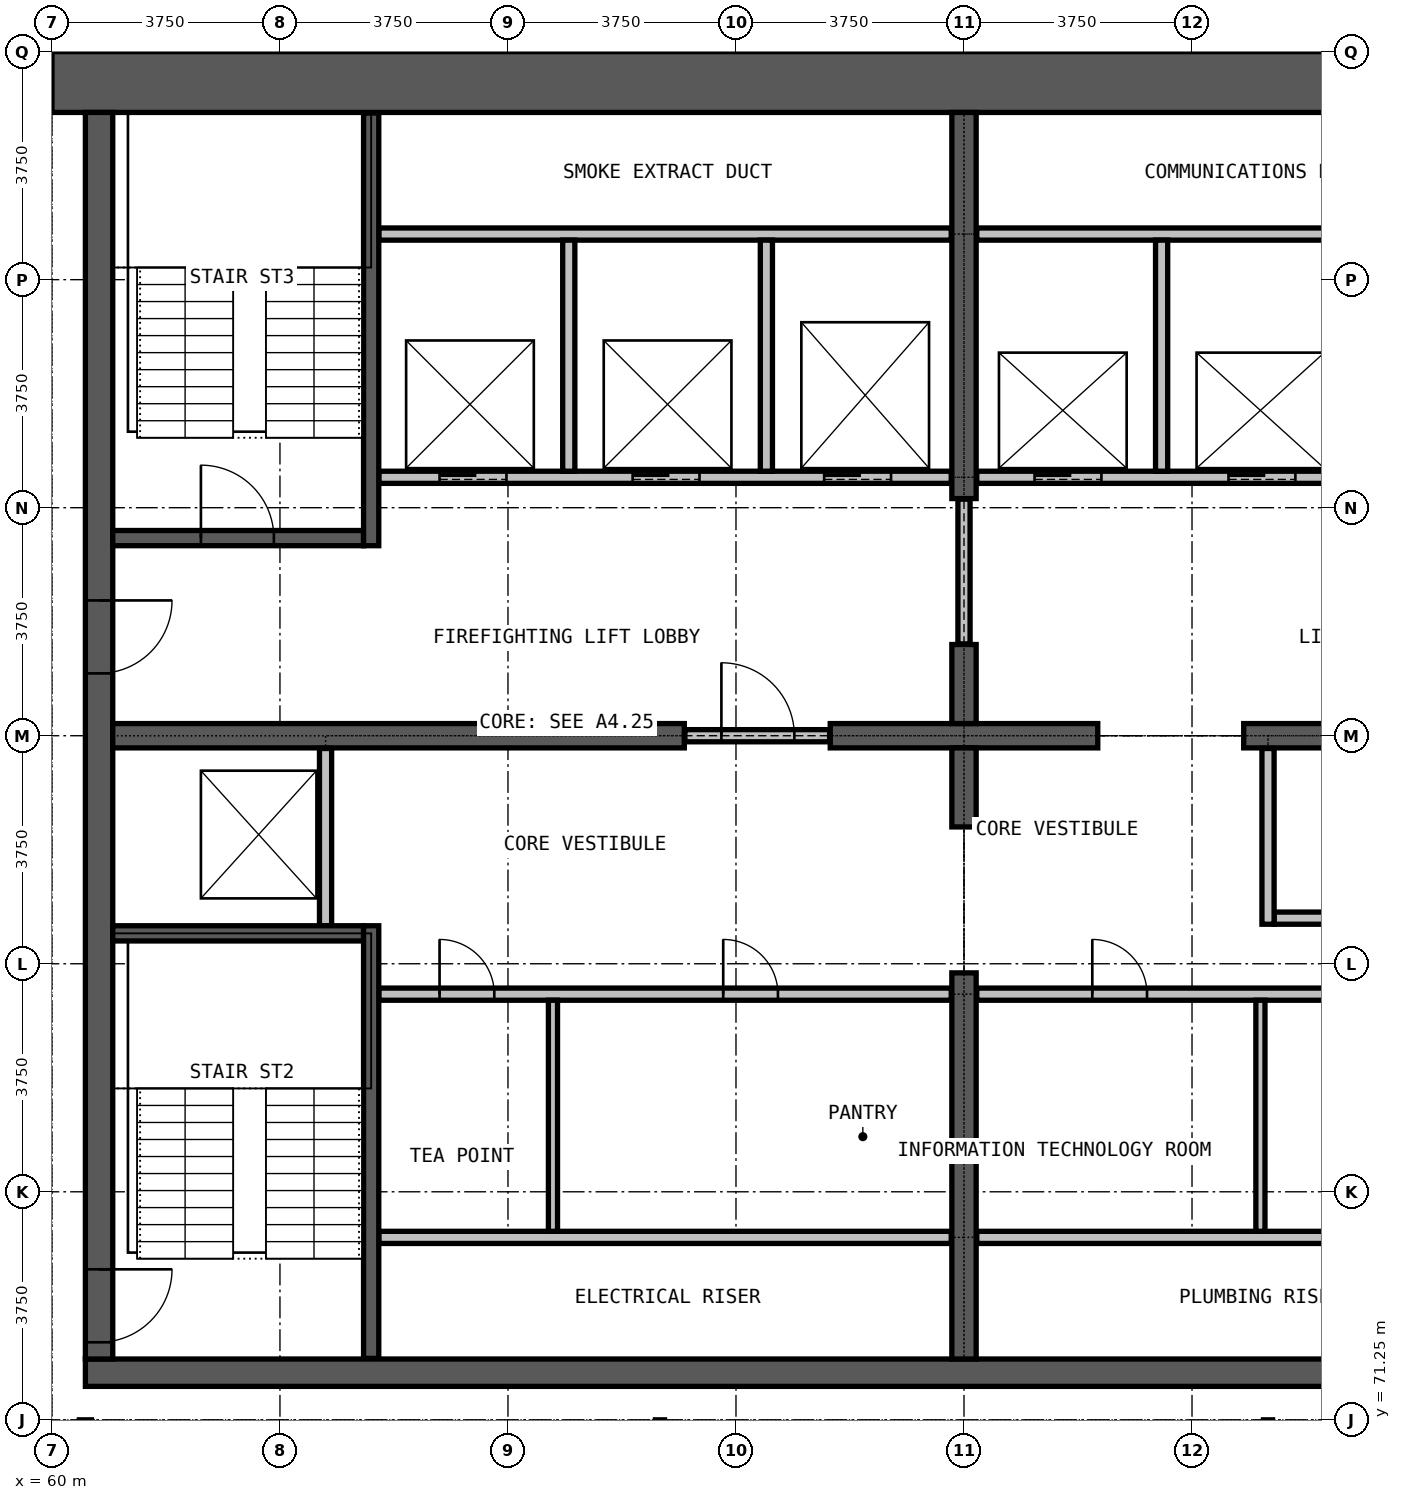
"""IFC4 building model, lengths in metres.
Left out: names, types, materials, properties, quantities, classifications, styles, units other than length and angle.
Written with IfcOpenShell. Run it as: python <this file> out.ifc"""

import sys

from ifc_helpers import new_model, si_unit, direction, frame, frame_2d, origin, place, context, subcontext, project, spatial, rectangle, extrude, element, fill, save


model = new_model("IFC4")
c1 = context("Model", 3, precision=1e-05, world=origin(), true_north=direction((0.0, 1.0)))
c2 = subcontext(c1, "Body", "Model", "MODEL_VIEW")
j1 = project(units=[si_unit("LENGTHUNIT", "METRE"), si_unit("PLANEANGLEUNIT", "RADIAN")], contexts=[c1])
p1 = place(None, origin())
s1 = spatial("IfcSite", under=j1, at=p1, CompositionType="ELEMENT")
p2 = place(p1, origin())
s2 = spatial("IfcBuilding", under=s1, at=p2, CompositionType="ELEMENT")
p3 = place(p2, frame((0.0, 0.0, 258.5)))
s3 = spatial("IfcBuildingStorey", under=s2, at=p3, CompositionType="ELEMENT", Elevation=258.5)
p4 = place(p3, frame((60.55, 72.025, 0.0), z_axis=(0.0, 0.0, 1.0), x_axis=(1.0, 0.0, 0.0)))
e1 = element("IfcWall", 1, at=p4, inside=s3, PredefinedType="SHEAR", context=c2, shape_type="SweptSolid", body=[
    extrude(rectangle(XDim=28.9, YDim=0.45, at=frame_2d((14.45, 0.0))), origin(), (0.0, 0.0, 1.0), 3.6),
])
p5 = place(p3, frame((90.0, 93.25, 0.0), z_axis=(0.0, 0.0, 1.0), x_axis=(-1.0, 0.0, 0.0)))
e2 = element("IfcWall", 2, at=p5, inside=s3, PredefinedType="SHEAR", context=c2, shape_type="SweptSolid", body=[
    extrude(rectangle(XDim=30.0, YDim=1.0, at=frame_2d((15.0, 0.0))), origin(), (0.0, 0.0, 1.0), 3.6),
])
p6 = place(p3, frame((60.775, 92.75, 0.0), z_axis=(0.0, 0.0, 1.0), x_axis=(0.0, -1.0, 0.0)))
e3 = element("IfcWall", 3, at=p6, inside=s3, PredefinedType="SHEAR", context=c2, shape_type="SweptSolid", body=[
    extrude(rectangle(XDim=20.5, YDim=0.45, at=frame_2d((10.25, 0.0))), origin(), (0.0, 0.0, 1.0), 3.6),
])
p7 = place(p6, frame((19.025, 0.0, 0.0)))
e4 = element("IfcOpeningElement", 4, at=p7, cuts=e3, PredefinedType="OPENING", context=c2, shape_type="SweptSolid", body=[
    extrude(rectangle(XDim=1.2, YDim=2.2, at=frame_2d((0.6, 1.1))), frame((0.0, 0.235, 0.0), z_axis=(0.0, -1.0, 0.0), x_axis=(1.0, 0.0, 0.0)), (0.0, 0.0, 1.0), 0.47),
])
p8 = place(p6, frame((8.025, 0.0, 0.0)))
e5 = element("IfcOpeningElement", 5, at=p8, cuts=e3, PredefinedType="OPENING", context=c2, shape_type="SweptSolid", body=[
    extrude(rectangle(XDim=1.2, YDim=2.2, at=frame_2d((0.6, 1.1))), frame((0.0, 0.235, 0.0), z_axis=(0.0, -1.0, 0.0), x_axis=(1.0, 0.0, 0.0)), (0.0, 0.0, 1.0), 0.47),
])
p9 = place(p3, frame((61.0, 82.5, 0.0), z_axis=(0.0, 0.0, 1.0), x_axis=(1.0, 0.0, 0.0)))
e6 = element("IfcWall", 6, at=p9, inside=s3, PredefinedType="SHEAR", context=c2, shape_type="SweptSolid", body=[
    extrude(rectangle(XDim=9.4, YDim=0.4, at=frame_2d((4.7, 0.0))), origin(), (0.0, 0.0, 1.0), 3.6),
])
p10 = place(p3, frame((72.8, 82.5, 0.0), z_axis=(0.0, 0.0, 1.0), x_axis=(1.0, 0.0, 0.0)))
e7 = element("IfcWall", 7, at=p10, inside=s3, PredefinedType="SHEAR", context=c2, shape_type="SweptSolid", body=[
    extrude(rectangle(XDim=4.4, YDim=0.4, at=frame_2d((2.2, 0.0))), origin(), (0.0, 0.0, 1.0), 3.6),
])
p11 = place(p3, frame((79.6, 82.5, 0.0), z_axis=(0.0, 0.0, 1.0), x_axis=(1.0, 0.0, 0.0)))
e8 = element("IfcWall", 8, at=p11, inside=s3, PredefinedType="SHEAR", context=c2, shape_type="SweptSolid", body=[
    extrude(rectangle(XDim=9.4, YDim=0.4, at=frame_2d((4.7, 0.0))), origin(), (0.0, 0.0, 1.0), 3.6),
])
p12 = place(p3, frame((75.0, 72.25, 0.0), z_axis=(0.0, 0.0, 1.0), x_axis=(0.0, 1.0, 0.0)))
e9 = element("IfcWall", 9, at=p12, inside=s3, PredefinedType="SHEAR", context=c2, shape_type="SweptSolid", body=[
    extrude(rectangle(XDim=6.35, YDim=0.4, at=frame_2d((3.175, 0.0))), origin(), (0.0, 0.0, 1.0), 3.6),
])
for number, where, z_axis, x_axis in (
    (10, (75.0, 81.0, 0.0), (0.0, 0.0, 1.0), (0.0, 1.0, 0.0)),
    (11, (75.0, 82.7, 0.0), (0.0, 0.0, 1.0), (0.0, 1.0, 0.0)),
):
    element("IfcWall", number, at=place(p3, frame(where, z_axis=z_axis, x_axis=x_axis)), inside=s3, PredefinedType="SHEAR", context=c2, shape_type="SweptSolid", body=[
        extrude(rectangle(XDim=1.3, YDim=0.4, at=frame_2d((0.65, 0.0))), origin(), (0.0, 0.0, 1.0), 3.6),
    ])
p13 = place(p3, frame((75.0, 86.4, 0.0), z_axis=(0.0, 0.0, 1.0), x_axis=(0.0, 1.0, 0.0)))
e12 = element("IfcWall", 12, at=p13, inside=s3, PredefinedType="SHEAR", context=c2, shape_type="SweptSolid", body=[
    extrude(rectangle(XDim=6.35, YDim=0.4, at=frame_2d((3.175, 0.0))), origin(), (0.0, 0.0, 1.0), 3.6),
])
for number, where, z_axis, x_axis in (
    (13, (65.375, 74.25, 0.0), (0.0, 0.0, 1.0), (1.0, 0.0, 0.0)),
    (14, (75.21, 74.25, 0.0), (0.0, 0.0, 1.0), (1.0, 0.0, 0.0)),
):
    element("IfcWall", number, at=place(p3, frame(where, z_axis=z_axis, x_axis=x_axis)), inside=s3, PredefinedType="PARTITIONING", context=c2, shape_type="SweptSolid", body=[
        extrude(rectangle(XDim=9.415, YDim=0.2, at=frame_2d((4.708, 0.0))), origin(), (0.0, 0.0, 1.0), 3.3),
    ])
p14 = place(p3, frame((65.375, 78.25, 0.0), z_axis=(0.0, 0.0, 1.0), x_axis=(1.0, 0.0, 0.0)))
e15 = element("IfcWall", 15, at=p14, inside=s3, PredefinedType="PARTITIONING", context=c2, shape_type="SweptSolid", body=[
    extrude(rectangle(XDim=9.415, YDim=0.2, at=frame_2d((4.708, 0.0))), origin(), (0.0, 0.0, 1.0), 3.3),
])
p15 = place(p14, frame((1.0, 0.0, 0.0)))
e16 = element("IfcOpeningElement", 16, at=p15, cuts=e15, PredefinedType="OPENING", context=c2, shape_type="SweptSolid", body=[
    extrude(rectangle(XDim=0.9, YDim=2.2, at=frame_2d((0.45, 1.1))), frame((0.0, 0.11, 0.0), z_axis=(0.0, -1.0, 0.0), x_axis=(1.0, 0.0, 0.0)), (0.0, 0.0, 1.0), 0.22),
])
p16 = place(p14, frame((5.665, 0.0, 0.0)))
e17 = element("IfcOpeningElement", 17, at=p16, cuts=e15, PredefinedType="OPENING", context=c2, shape_type="SweptSolid", body=[
    extrude(rectangle(XDim=0.9, YDim=2.2, at=frame_2d((0.45, 1.1))), frame((0.0, 0.11, 0.0), z_axis=(0.0, -1.0, 0.0), x_axis=(1.0, 0.0, 0.0)), (0.0, 0.0, 1.0), 0.22),
])
p17 = place(p3, frame((75.21, 78.25, 0.0), z_axis=(0.0, 0.0, 1.0), x_axis=(1.0, 0.0, 0.0)))
e18 = element("IfcWall", 18, at=p17, inside=s3, PredefinedType="PARTITIONING", context=c2, shape_type="SweptSolid", body=[
    extrude(rectangle(XDim=9.415, YDim=0.2, at=frame_2d((4.708, 0.0))), origin(), (0.0, 0.0, 1.0), 3.3),
])
p18 = place(p17, frame((1.9, 0.0, 0.0)))
e19 = element("IfcOpeningElement", 19, at=p18, cuts=e18, PredefinedType="OPENING", context=c2, shape_type="SweptSolid", body=[
    extrude(rectangle(XDim=0.9, YDim=2.2, at=frame_2d((0.45, 1.1))), frame((0.0, 0.11, 0.0), z_axis=(0.0, -1.0, 0.0), x_axis=(1.0, 0.0, 0.0)), (0.0, 0.0, 1.0), 0.22),
])
p19 = place(p17, frame((6.565, 0.0, 0.0)))
e20 = element("IfcOpeningElement", 20, at=p19, cuts=e18, PredefinedType="OPENING", context=c2, shape_type="SweptSolid", body=[
    extrude(rectangle(XDim=0.9, YDim=2.2, at=frame_2d((0.45, 1.1))), frame((0.0, 0.11, 0.0), z_axis=(0.0, -1.0, 0.0), x_axis=(1.0, 0.0, 0.0)), (0.0, 0.0, 1.0), 0.22),
])
p20 = place(p3, frame((80.1, 79.5, 0.0), z_axis=(0.0, 0.0, 1.0), x_axis=(1.0, 0.0, 0.0)))
e21 = element("IfcWall", 21, at=p20, inside=s3, PredefinedType="PARTITIONING", context=c2, shape_type="SweptSolid", body=[
    extrude(rectangle(XDim=5.3, YDim=0.2, at=frame_2d((2.65, 0.0))), origin(), (0.0, 0.0, 1.0), 3.3),
])
p21 = place(p20, frame((2.2, 0.0, 0.0)))
e22 = element("IfcOpeningElement", 22, at=p21, cuts=e21, PredefinedType="OPENING", context=c2, shape_type="SweptSolid", body=[
    extrude(rectangle(XDim=0.9, YDim=2.2, at=frame_2d((0.45, 1.1))), frame((0.0, 0.11, 0.0), z_axis=(0.0, -1.0, 0.0), x_axis=(1.0, 0.0, 0.0)), (0.0, 0.0, 1.0), 0.22),
])
p22 = place(p3, frame((70.41, 82.5, 0.0), z_axis=(0.0, 0.0, 1.0), x_axis=(1.0, 0.0, 0.0)))
e23 = element("IfcWall", 23, at=p22, inside=s3, PredefinedType="PARTITIONING", context=c2, shape_type="SweptSolid", body=[
    extrude(rectangle(XDim=2.38, YDim=0.2, at=frame_2d((1.19, 0.0))), origin(), (0.0, 0.0, 1.0), 2.4),
])
p23 = place(p22, frame((0.6, 0.0, 0.0)))
e24 = element("IfcOpeningElement", 24, at=p23, cuts=e23, PredefinedType="OPENING", context=c2, shape_type="SweptSolid", body=[
    extrude(rectangle(XDim=1.2, YDim=2.2, at=frame_2d((0.6, 1.1))), frame((0.0, 0.11, 0.0), z_axis=(0.0, -1.0, 0.0), x_axis=(1.0, 0.0, 0.0)), (0.0, 0.0, 1.0), 0.22),
])
p24 = place(p3, frame((75.0, 84.01, 0.0), z_axis=(0.0, 0.0, 1.0), x_axis=(0.0, 1.0, 0.0)))
e25 = element("IfcWall", 25, at=p24, inside=s3, PredefinedType="PARTITIONING", context=c2, shape_type="SweptSolid", body=[
    extrude(rectangle(XDim=2.38, YDim=0.2, at=frame_2d((1.19, 0.0))), origin(), (0.0, 0.0, 1.0), 2.4),
])
p25 = place(p3, frame((80.0, 79.4, 0.0), z_axis=(0.0, 0.0, 1.0), x_axis=(0.0, 1.0, 0.0)))
e26 = element("IfcWall", 26, at=p25, inside=s3, PredefinedType="PARTITIONING", context=c2, shape_type="SweptSolid", body=[
    extrude(rectangle(XDim=2.89, YDim=0.2, at=frame_2d((1.445, 0.0))), origin(), (0.0, 0.0, 1.0), 3.3),
])
for number, where, z_axis, x_axis in (
    (27, (68.24, 74.35, 0.0), (0.0, 0.0, 1.0), (0.0, 1.0, 0.0)),
    (28, (79.875, 74.35, 0.0), (0.0, 0.0, 1.0), (0.0, 1.0, 0.0)),
):
    element("IfcWall", number, at=place(p3, frame(where, z_axis=z_axis, x_axis=x_axis)), inside=s3, PredefinedType="PARTITIONING", context=c2, shape_type="SweptSolid", body=[
        extrude(rectangle(XDim=3.8, YDim=0.15, at=frame_2d((1.9, 0.0))), origin(), (0.0, 0.0, 1.0), 3.3),
    ])
p26 = place(p3, frame((65.375, 86.75, 0.0), z_axis=(0.0, 0.0, 1.0), x_axis=(1.0, 0.0, 0.0)))
e29 = element("IfcWall", 29, at=p26, inside=s3, PredefinedType="PARTITIONING", context=c2, shape_type="SweptSolid", body=[
    extrude(rectangle(XDim=9.415, YDim=0.2, at=frame_2d((4.708, 0.0))), origin(), (0.0, 0.0, 1.0), 3.3),
])
p27 = place(p26, frame((1.0, 0.0, 0.0)))
e30 = element("IfcOpeningElement", 30, at=p27, cuts=e29, PredefinedType="OPENING", context=c2, shape_type="SweptSolid", body=[
    extrude(rectangle(XDim=1.1, YDim=2.2, at=frame_2d((0.55, 1.1))), frame((0.0, 0.11, 0.0), z_axis=(0.0, -1.0, 0.0), x_axis=(1.0, 0.0, 0.0)), (0.0, 0.0, 1.0), 0.22),
])
p28 = place(p26, frame((4.175, 0.0, 0.0)))
e31 = element("IfcOpeningElement", 31, at=p28, cuts=e29, PredefinedType="OPENING", context=c2, shape_type="SweptSolid", body=[
    extrude(rectangle(XDim=1.1, YDim=2.2, at=frame_2d((0.55, 1.1))), frame((0.0, 0.11, 0.0), z_axis=(0.0, -1.0, 0.0), x_axis=(1.0, 0.0, 0.0)), (0.0, 0.0, 1.0), 0.22),
])
p29 = place(p26, frame((7.325, 0.0, 0.0)))
e32 = element("IfcOpeningElement", 32, at=p29, cuts=e29, PredefinedType="OPENING", context=c2, shape_type="SweptSolid", body=[
    extrude(rectangle(XDim=1.1, YDim=2.2, at=frame_2d((0.55, 1.1))), frame((0.0, 0.11, 0.0), z_axis=(0.0, -1.0, 0.0), x_axis=(1.0, 0.0, 0.0)), (0.0, 0.0, 1.0), 0.22),
])
p30 = place(p3, frame((75.21, 86.75, 0.0), z_axis=(0.0, 0.0, 1.0), x_axis=(1.0, 0.0, 0.0)))
e33 = element("IfcWall", 33, at=p30, inside=s3, PredefinedType="PARTITIONING", context=c2, shape_type="SweptSolid", body=[
    extrude(rectangle(XDim=9.415, YDim=0.2, at=frame_2d((4.708, 0.0))), origin(), (0.0, 0.0, 1.0), 3.3),
])
p31 = place(p30, frame((0.95, 0.0, 0.0)))
e34 = element("IfcOpeningElement", 34, at=p31, cuts=e33, PredefinedType="OPENING", context=c2, shape_type="SweptSolid", body=[
    extrude(rectangle(XDim=1.1, YDim=2.2, at=frame_2d((0.55, 1.1))), frame((0.0, 0.11, 0.0), z_axis=(0.0, -1.0, 0.0), x_axis=(1.0, 0.0, 0.0)), (0.0, 0.0, 1.0), 0.22),
])
p32 = place(p30, frame((4.14, 0.0, 0.0)))
e35 = element("IfcOpeningElement", 35, at=p32, cuts=e33, PredefinedType="OPENING", context=c2, shape_type="SweptSolid", body=[
    extrude(rectangle(XDim=1.1, YDim=2.2, at=frame_2d((0.55, 1.1))), frame((0.0, 0.11, 0.0), z_axis=(0.0, -1.0, 0.0), x_axis=(1.0, 0.0, 0.0)), (0.0, 0.0, 1.0), 0.22),
])
p33 = place(p30, frame((7.29, 0.0, 0.0)))
e36 = element("IfcOpeningElement", 36, at=p33, cuts=e33, PredefinedType="OPENING", context=c2, shape_type="SweptSolid", body=[
    extrude(rectangle(XDim=1.1, YDim=2.2, at=frame_2d((0.55, 1.1))), frame((0.0, 0.11, 0.0), z_axis=(0.0, -1.0, 0.0), x_axis=(1.0, 0.0, 0.0)), (0.0, 0.0, 1.0), 0.22),
])
for number, where, z_axis, x_axis in (
    (37, (65.375, 90.75, 0.0), (0.0, 0.0, 1.0), (1.0, 0.0, 0.0)),
    (38, (75.21, 90.75, 0.0), (0.0, 0.0, 1.0), (1.0, 0.0, 0.0)),
):
    element("IfcWall", number, at=place(p3, frame(where, z_axis=z_axis, x_axis=x_axis)), inside=s3, PredefinedType="PARTITIONING", context=c2, shape_type="SweptSolid", body=[
        extrude(rectangle(XDim=9.415, YDim=0.2, at=frame_2d((4.708, 0.0))), origin(), (0.0, 0.0, 1.0), 3.3),
    ])
p34 = place(p3, frame((64.5, 79.375, 0.0), z_axis=(0.0, 0.0, 1.0), x_axis=(0.0, 1.0, 0.0)))
e39 = element("IfcWall", 39, at=p34, inside=s3, PredefinedType="PARTITIONING", context=c2, shape_type="SweptSolid", body=[
    extrude(rectangle(XDim=2.915, YDim=0.2, at=frame_2d((1.458, 0.0))), origin(), (0.0, 0.0, 1.0), 3.3),
])
for number, where, z_axis, x_axis in (
    (40, (68.5, 86.85, 0.0), (0.0, 0.0, 1.0), (0.0, 1.0, 0.0)),
    (41, (71.75, 86.85, 0.0), (0.0, 0.0, 1.0), (0.0, 1.0, 0.0)),
    (42, (78.25, 86.85, 0.0), (0.0, 0.0, 1.0), (0.0, 1.0, 0.0)),
):
    element("IfcWall", number, at=place(p3, frame(where, z_axis=z_axis, x_axis=x_axis)), inside=s3, PredefinedType="PARTITIONING", context=c2, shape_type="SweptSolid", body=[
        extrude(rectangle(XDim=3.8, YDim=0.2, at=frame_2d((1.9, 0.0))), origin(), (0.0, 0.0, 1.0), 3.3),
    ])
p35 = place(p3, frame((61.0, 79.25, 0.0), z_axis=(0.0, 0.0, 1.0), x_axis=(1.0, 0.0, 0.0)))
e43 = element("IfcWall", 43, at=p35, inside=s3, PredefinedType="PARTITIONING", context=c2, shape_type="SweptSolid", body=[
    extrude(rectangle(XDim=4.125, YDim=0.25, at=frame_2d((2.062, 0.0))), origin(), (0.0, 0.0, 1.0), 3.3),
])
p36 = place(p3, frame((61.0, 85.75, 0.0), z_axis=(0.0, 0.0, 1.0), x_axis=(1.0, 0.0, 0.0)))
e44 = element("IfcWall", 44, at=p36, inside=s3, PredefinedType="PARTITIONING", context=c2, shape_type="SweptSolid", body=[
    extrude(rectangle(XDim=4.125, YDim=0.25, at=frame_2d((2.062, 0.0))), origin(), (0.0, 0.0, 1.0), 3.3),
])
p37 = place(p36, frame((1.45, 0.0, 0.0)))
e45 = element("IfcOpeningElement", 45, at=p37, cuts=e44, PredefinedType="OPENING", context=c2, shape_type="SweptSolid", body=[
    extrude(rectangle(XDim=1.2, YDim=2.2, at=frame_2d((0.6, 1.1))), frame((0.0, 0.135, 0.0), z_axis=(0.0, -1.0, 0.0), x_axis=(1.0, 0.0, 0.0)), (0.0, 0.0, 1.0), 0.27),
])
for number, where, z_axis, x_axis in (
    (46, (65.25, 72.26, 0.0), (0.0, 0.0, 1.0), (0.0, 1.0, 0.0)),
    (47, (65.25, 85.625, 0.0), (0.0, 0.0, 1.0), (0.0, 1.0, 0.0)),
):
    element("IfcWall", number, at=place(p3, frame(where, z_axis=z_axis, x_axis=x_axis)), inside=s3, PredefinedType="PARTITIONING", context=c2, shape_type="SweptSolid", body=[
        extrude(rectangle(XDim=7.115, YDim=0.25, at=frame_2d((3.558, 0.0))), origin(), (0.0, 0.0, 1.0), 3.3),
    ])
p38 = place(p31, origin())
e48 = element("IfcDoor", 48, at=p38, inside=s3, OperationType="DOUBLE_DOOR_SLIDING", PredefinedType="DOOR", context=c2, shape_type="SweptSolid", body=[
    extrude(rectangle(XDim=1.1, YDim=2.2, at=frame_2d((0.55, 1.1))), frame((0.0, 0.025, 0.0), z_axis=(0.0, -1.0, 0.0), x_axis=(1.0, 0.0, 0.0)), (0.0, 0.0, 1.0), 0.05),
])
fill(e34, e48)
p39 = place(p32, origin())
e49 = element("IfcDoor", 49, at=p39, inside=s3, OperationType="DOUBLE_DOOR_SLIDING", PredefinedType="DOOR", context=c2, shape_type="SweptSolid", body=[
    extrude(rectangle(XDim=1.1, YDim=2.2, at=frame_2d((0.55, 1.1))), frame((0.0, 0.025, 0.0), z_axis=(0.0, -1.0, 0.0), x_axis=(1.0, 0.0, 0.0)), (0.0, 0.0, 1.0), 0.05),
])
fill(e35, e49)
p40 = place(p27, origin())
e50 = element("IfcDoor", 50, at=p40, inside=s3, OperationType="DOUBLE_DOOR_SLIDING", PredefinedType="DOOR", context=c2, shape_type="SweptSolid", body=[
    extrude(rectangle(XDim=1.1, YDim=2.2, at=frame_2d((0.55, 1.1))), frame((0.0, 0.025, 0.0), z_axis=(0.0, -1.0, 0.0), x_axis=(1.0, 0.0, 0.0)), (0.0, 0.0, 1.0), 0.05),
])
fill(e30, e50)
p41 = place(p28, origin())
e51 = element("IfcDoor", 51, at=p41, inside=s3, OperationType="DOUBLE_DOOR_SLIDING", PredefinedType="DOOR", context=c2, shape_type="SweptSolid", body=[
    extrude(rectangle(XDim=1.1, YDim=2.2, at=frame_2d((0.55, 1.1))), frame((0.0, 0.025, 0.0), z_axis=(0.0, -1.0, 0.0), x_axis=(1.0, 0.0, 0.0)), (0.0, 0.0, 1.0), 0.05),
])
fill(e31, e51)
p42 = place(p29, origin())
e52 = element("IfcDoor", 52, at=p42, inside=s3, OperationType="DOUBLE_DOOR_SLIDING", PredefinedType="DOOR", context=c2, shape_type="SweptSolid", body=[
    extrude(rectangle(XDim=1.1, YDim=2.2, at=frame_2d((0.55, 1.1))), frame((0.0, 0.025, 0.0), z_axis=(0.0, -1.0, 0.0), x_axis=(1.0, 0.0, 0.0)), (0.0, 0.0, 1.0), 0.05),
])
fill(e32, e52)
p43 = place(p23, origin())
e53 = element("IfcDoor", 53, at=p43, inside=s3, OperationType="SINGLE_SWING_LEFT", PredefinedType="DOOR", context=c2, shape_type="SweptSolid", body=[
    extrude(rectangle(XDim=1.2, YDim=2.2, at=frame_2d((0.6, 1.1))), frame((0.0, 0.025, 0.0), z_axis=(0.0, -1.0, 0.0), x_axis=(1.0, 0.0, 0.0)), (0.0, 0.0, 1.0), 0.05),
])
fill(e24, e53)
p44 = place(p37, origin())
e54 = element("IfcDoor", 54, at=p44, inside=s3, OperationType="SINGLE_SWING_LEFT", PredefinedType="DOOR", context=c2, shape_type="SweptSolid", body=[
    extrude(rectangle(XDim=1.2, YDim=2.2, at=frame_2d((0.6, 1.1))), frame((0.0, 0.025, 0.0), z_axis=(0.0, -1.0, 0.0), x_axis=(1.0, 0.0, 0.0)), (0.0, 0.0, 1.0), 0.05),
])
fill(e45, e54)
p45 = place(p7, origin())
e55 = element("IfcDoor", 55, at=p45, inside=s3, OperationType="SINGLE_SWING_LEFT", PredefinedType="DOOR", context=c2, shape_type="SweptSolid", body=[
    extrude(rectangle(XDim=1.2, YDim=2.2, at=frame_2d((0.6, 1.1))), frame((0.0, 0.025, 0.0), z_axis=(0.0, -1.0, 0.0), x_axis=(1.0, 0.0, 0.0)), (0.0, 0.0, 1.0), 0.05),
])
fill(e4, e55)
p46 = place(p8, origin())
e56 = element("IfcDoor", 56, at=p46, inside=s3, OperationType="SINGLE_SWING_RIGHT", PredefinedType="DOOR", context=c2, shape_type="SweptSolid", body=[
    extrude(rectangle(XDim=1.2, YDim=2.2, at=frame_2d((0.6, 1.1))), frame((0.0, 0.025, 0.0), z_axis=(0.0, -1.0, 0.0), x_axis=(1.0, 0.0, 0.0)), (0.0, 0.0, 1.0), 0.05),
])
fill(e5, e56)
p47 = place(p15, origin())
e57 = element("IfcDoor", 57, at=p47, inside=s3, OperationType="SINGLE_SWING_LEFT", PredefinedType="DOOR", context=c2, shape_type="SweptSolid", body=[
    extrude(rectangle(XDim=0.9, YDim=2.2, at=frame_2d((0.45, 1.1))), frame((0.0, 0.025, 0.0), z_axis=(0.0, -1.0, 0.0), x_axis=(1.0, 0.0, 0.0)), (0.0, 0.0, 1.0), 0.05),
])
fill(e16, e57)
p48 = place(p16, origin())
e58 = element("IfcDoor", 58, at=p48, inside=s3, OperationType="SINGLE_SWING_LEFT", PredefinedType="DOOR", context=c2, shape_type="SweptSolid", body=[
    extrude(rectangle(XDim=0.9, YDim=2.2, at=frame_2d((0.45, 1.1))), frame((0.0, 0.025, 0.0), z_axis=(0.0, -1.0, 0.0), x_axis=(1.0, 0.0, 0.0)), (0.0, 0.0, 1.0), 0.05),
])
fill(e17, e58)
p49 = place(p18, origin())
e59 = element("IfcDoor", 59, at=p49, inside=s3, OperationType="SINGLE_SWING_RIGHT", PredefinedType="DOOR", context=c2, shape_type="SweptSolid", body=[
    extrude(rectangle(XDim=0.9, YDim=2.2, at=frame_2d((0.45, 1.1))), frame((0.0, 0.025, 0.0), z_axis=(0.0, -1.0, 0.0), x_axis=(1.0, 0.0, 0.0)), (0.0, 0.0, 1.0), 0.05),
])
fill(e19, e59)
save(model, sys.argv[1])
